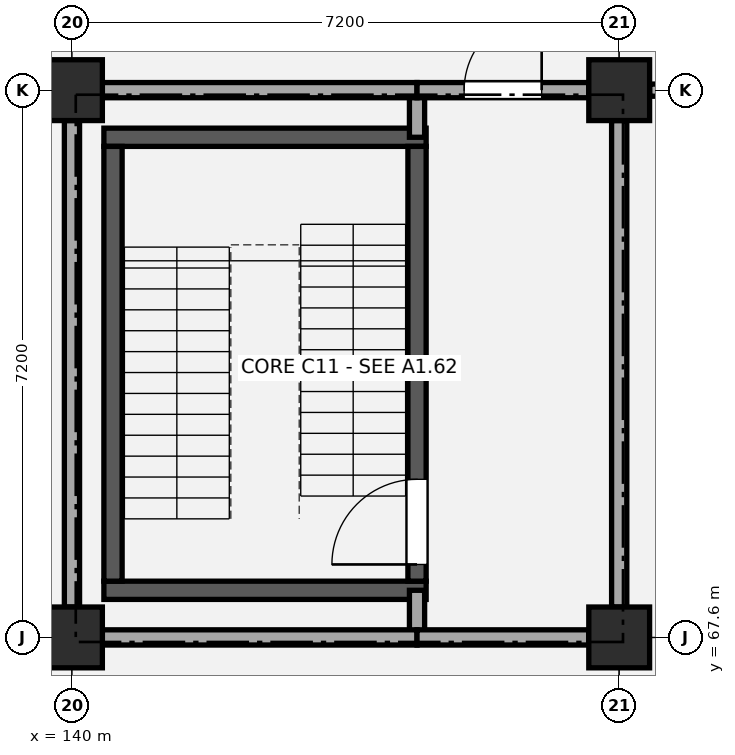
"""IFC4 building model, lengths in metres.
Left out: names, types, materials, properties, quantities, classifications, styles, units other than length and angle.
Written with IfcOpenShell. Run it as: python <this file> out.ifc"""

import sys

from ifc_helpers import new_model, si_unit, direction, frame, frame_2d, origin, origin_2d, place, context, subcontext, project, spatial, rectangle, extrude, element, fill, save


model = new_model("IFC4")
c1 = context("Model", 3, precision=1e-05, world=origin(), true_north=direction((0.0, 1.0)))
c2 = subcontext(c1, "Body", "Model", "MODEL_VIEW")
j1 = project(units=[si_unit("LENGTHUNIT", "METRE"), si_unit("PLANEANGLEUNIT", "RADIAN")], contexts=[c1])
p1 = place(None, origin())
s1 = spatial("IfcSite", under=j1, at=p1, CompositionType="ELEMENT")
p2 = place(p1, origin())
s2 = spatial("IfcBuilding", under=s1, at=p2, CompositionType="ELEMENT")
p3 = place(p2, origin())
s3 = spatial("IfcBuildingStorey", under=s2, at=p3, CompositionType="ELEMENT", Elevation=0.0)
for number, where, z_axis, x_axis in (
    (1, (140.0, 67.6, -0.35), (0.0, 0.0, 1.0), (1.0, 0.0, 0.0)),
    (2, (140.0, 74.8, -0.35), (0.0, 0.0, 1.0), (1.0, 0.0, 0.0)),
    (3, (147.2, 67.6, -0.35), (0.0, 0.0, 1.0), (1.0, 0.0, 0.0)),
    (4, (147.2, 74.8, -0.35), (0.0, 0.0, 1.0), (1.0, 0.0, 0.0)),
):
    element("IfcColumn", number, at=place(p3, frame(where, z_axis=z_axis, x_axis=x_axis)), inside=s3, PredefinedType="COLUMN", context=c2, shape_type="SweptSolid", body=[
        extrude(rectangle(XDim=0.8, YDim=0.8, at=origin_2d()), origin(), (0.0, 0.0, 1.0), 5.03),
    ])
for number, where, z_axis, x_axis in (
    (5, (140.42, 68.22, 0.0), (0.0, 0.0, 1.0), (1.0, 0.0, 0.0)),
    (6, (140.42, 74.18, 0.0), (0.0, 0.0, 1.0), (1.0, 0.0, 0.0)),
):
    element("IfcWall", number, at=place(p3, frame(where, z_axis=z_axis, x_axis=x_axis)), inside=s3, PredefinedType="SHEAR", context=c2, shape_type="SweptSolid", body=[
        extrude(rectangle(XDim=4.24, YDim=0.24, at=frame_2d((2.12, 0.0))), origin(), (0.0, 0.0, 1.0), 4.38),
    ])
p4 = place(p3, frame((140.54, 68.34, 0.0), z_axis=(0.0, 0.0, 1.0), x_axis=(0.0, 1.0, 0.0)))
e7 = element("IfcWall", 7, at=p4, inside=s3, PredefinedType="SHEAR", context=c2, shape_type="SweptSolid", body=[
    extrude(rectangle(XDim=5.72, YDim=0.24, at=frame_2d((2.86, 0.0))), origin(), (0.0, 0.0, 1.0), 4.38),
])
p5 = place(p3, frame((144.54, 68.34, 0.0), z_axis=(0.0, 0.0, 1.0), x_axis=(0.0, 1.0, 0.0)))
e8 = element("IfcWall", 8, at=p5, inside=s3, PredefinedType="SHEAR", context=c2, shape_type="SweptSolid", body=[
    extrude(rectangle(XDim=5.72, YDim=0.24, at=frame_2d((2.86, 0.0))), origin(), (0.0, 0.0, 1.0), 4.38),
])
p6 = place(p5, frame((0.22, 0.0, 0.0)))
e9 = element("IfcOpeningElement", 9, at=p6, cuts=e8, PredefinedType="OPENING", context=c2, shape_type="SweptSolid", body=[
    extrude(rectangle(XDim=1.12, YDim=2.15, at=frame_2d((0.56, 1.075))), frame((0.0, 0.13, 0.0), z_axis=(0.0, -1.0, 0.0), x_axis=(1.0, 0.0, 0.0)), (0.0, 0.0, 1.0), 0.26),
])
p7 = place(p3, frame((144.54, 67.6, 0.0), z_axis=(0.0, 0.0, 1.0), x_axis=(0.0, 1.0, 0.0)))
e10 = element("IfcWall", 10, at=p7, inside=s3, PredefinedType="PARTITIONING", context=c2, shape_type="SweptSolid", body=[
    extrude(rectangle(XDim=0.62, YDim=0.2, at=frame_2d((0.31, 0.0))), origin(), (0.0, 0.0, 1.0), 3.52),
])
p8 = place(p3, frame((144.54, 74.18, 0.0), z_axis=(0.0, 0.0, 1.0), x_axis=(0.0, 1.0, 0.0)))
e11 = element("IfcWall", 11, at=p8, inside=s3, PredefinedType="PARTITIONING", context=c2, shape_type="SweptSolid", body=[
    extrude(rectangle(XDim=0.62, YDim=0.2, at=frame_2d((0.31, 0.0))), origin(), (0.0, 0.0, 1.0), 3.62),
])
for number, where, z_axis, x_axis in (
    (12, (140.0, 68.0, 0.0), (0.0, 0.0, 1.0), (0.0, 1.0, 0.0)),
    (13, (147.2, 68.0, 0.0), (0.0, 0.0, 1.0), (0.0, 1.0, 0.0)),
):
    element("IfcWall", number, at=place(p3, frame(where, z_axis=z_axis, x_axis=x_axis)), inside=s3, PredefinedType="PARTITIONING", context=c2, shape_type="SweptSolid", body=[
        extrude(rectangle(XDim=6.4, YDim=0.2, at=frame_2d((3.2, 0.0))), origin(), (0.0, 0.0, 1.0), 3.62),
    ])
p9 = place(p3, frame((140.4, 67.6, 0.0), z_axis=(0.0, 0.0, 1.0), x_axis=(1.0, 0.0, 0.0)))
e14 = element("IfcWall", 14, at=p9, inside=s3, PredefinedType="PARTITIONING", context=c2, shape_type="SweptSolid", body=[
    extrude(rectangle(XDim=4.14, YDim=0.2, at=frame_2d((2.07, 0.0))), origin(), (0.0, 0.0, 1.0), 3.52),
])
p10 = place(p3, frame((144.54, 67.6, 0.0), z_axis=(0.0, 0.0, 1.0), x_axis=(1.0, 0.0, 0.0)))
e15 = element("IfcWall", 15, at=p10, inside=s3, PredefinedType="PARTITIONING", context=c2, shape_type="SweptSolid", body=[
    extrude(rectangle(XDim=2.26, YDim=0.2, at=frame_2d((1.13, 0.0))), origin(), (0.0, 0.0, 1.0), 3.52),
])
p11 = place(p3, frame((140.4, 74.8, 0.0), z_axis=(0.0, 0.0, 1.0), x_axis=(1.0, 0.0, 0.0)))
e16 = element("IfcWall", 16, at=p11, inside=s3, PredefinedType="PARTITIONING", context=c2, shape_type="SweptSolid", body=[
    extrude(rectangle(XDim=4.14, YDim=0.2, at=frame_2d((2.07, 0.0))), origin(), (0.0, 0.0, 1.0), 3.62),
])
p12 = place(p3, frame((144.54, 74.8, 0.0), z_axis=(0.0, 0.0, 1.0), x_axis=(1.0, 0.0, 0.0)))
e17 = element("IfcWall", 17, at=p12, inside=s3, PredefinedType="PARTITIONING", context=c2, shape_type="SweptSolid", body=[
    extrude(rectangle(XDim=2.26, YDim=0.2, at=frame_2d((1.13, 0.0))), origin(), (0.0, 0.0, 1.0), 3.62),
])
p13 = place(p12, frame((0.62, 0.0, 0.0)))
e18 = element("IfcOpeningElement", 18, at=p13, cuts=e17, PredefinedType="OPENING", context=c2, shape_type="SweptSolid", body=[
    extrude(rectangle(XDim=1.02, YDim=2.15, at=frame_2d((0.51, 1.075))), frame((0.0, 0.11, 0.0), z_axis=(0.0, -1.0, 0.0), x_axis=(1.0, 0.0, 0.0)), (0.0, 0.0, 1.0), 0.22),
])
p14 = place(p3, frame((147.6, 74.8, 0.0), z_axis=(0.0, 0.0, 1.0), x_axis=(1.0, 0.0, 0.0)))
e19 = element("IfcWall", 19, at=p14, inside=s3, PredefinedType="PARTITIONING", context=c2, shape_type="SweptSolid", body=[
    extrude(rectangle(XDim=6.425, YDim=0.16, at=frame_2d((3.212, 0.0))), origin(), (0.0, 0.0, 1.0), 3.52),
])
p15 = place(p14, frame((2.633, 0.0, 0.0)))
e20 = element("IfcOpeningElement", 20, at=p15, cuts=e19, PredefinedType="OPENING", context=c2, shape_type="SweptSolid", body=[
    extrude(rectangle(XDim=1.16, YDim=2.18, at=frame_2d((0.58, 1.09))), frame((0.0, 0.09, 0.0), z_axis=(0.0, -1.0, 0.0), x_axis=(1.0, 0.0, 0.0)), (0.0, 0.0, 1.0), 0.18),
])
p16 = place(p6, origin())
e21 = element("IfcDoor", 21, at=p16, inside=s3, OperationType="SINGLE_SWING_LEFT", PredefinedType="DOOR", context=c2, shape_type="SweptSolid", body=[
    extrude(rectangle(XDim=1.12, YDim=2.15, at=frame_2d((0.56, 1.075))), frame((0.0, 0.025, 0.0), z_axis=(0.0, -1.0, 0.0), x_axis=(1.0, 0.0, 0.0)), (0.0, 0.0, 1.0), 0.05),
])
fill(e9, e21)
p17 = place(p13, origin())
e22 = element("IfcDoor", 22, at=p17, inside=s3, OperationType="SINGLE_SWING_RIGHT", PredefinedType="DOOR", context=c2, shape_type="SweptSolid", body=[
    extrude(rectangle(XDim=1.02, YDim=2.15, at=frame_2d((0.51, 1.075))), frame((0.0, 0.025, 0.0), z_axis=(0.0, -1.0, 0.0), x_axis=(1.0, 0.0, 0.0)), (0.0, 0.0, 1.0), 0.05),
])
fill(e18, e22)
save(model, sys.argv[1])
